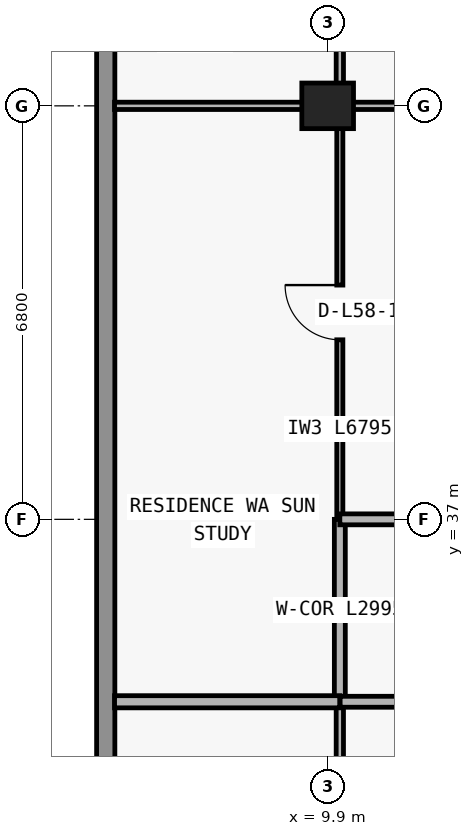
"""IFC4 building model, lengths in metres.
Left out: names, types, materials, properties, quantities, classifications, styles, units other than length and angle.
Written with IfcOpenShell. Run it as: python <this file> out.ifc"""

import sys

from ifc_helpers import new_model, si_unit, direction, frame, frame_2d, origin, origin_2d, place, context, subcontext, project, spatial, rectangle, extrude, element, fill, save


model = new_model("IFC4")
c1 = context("Model", 3, precision=1e-05, world=origin(), true_north=direction((0.0, 1.0)))
c2 = subcontext(c1, "Body", "Model", "MODEL_VIEW")
j1 = project(units=[si_unit("LENGTHUNIT", "METRE"), si_unit("PLANEANGLEUNIT", "RADIAN")], contexts=[c1])
p1 = place(None, origin())
s1 = spatial("IfcSite", under=j1, at=p1, CompositionType="ELEMENT")
p2 = place(p1, origin())
s2 = spatial("IfcBuilding", under=s1, at=p2, CompositionType="ELEMENT")
p3 = place(p2, frame((0.0, 0.0, 208.2)))
s3 = spatial("IfcBuildingStorey", under=s2, at=p3, CompositionType="ELEMENT", Elevation=208.2)
p4 = place(p3, frame((9.9, 43.8, 0.0), z_axis=(0.0, 0.0, 1.0), x_axis=(1.0, 0.0, 0.0)))
e1 = element("IfcColumn", 1, at=p4, inside=s3, PredefinedType="COLUMN", context=c2, shape_type="SweptSolid", body=[
    extrude(rectangle(XDim=0.85, YDim=0.75, at=origin_2d()), origin(), (0.0, 0.0, 1.0), 3.05),
])
p5 = place(p3, frame((6.25, 29.1, 0.0), z_axis=(0.0, 0.0, 1.0), x_axis=(0.0, 1.0, 0.0)))
e2 = element("IfcWall", 2, at=p5, inside=s3, PredefinedType="STANDARD", context=c2, shape_type="SweptSolid", body=[
    extrude(rectangle(XDim=17.9, YDim=0.3, at=frame_2d((8.95, 0.0))), origin(), (0.0, 0.0, 1.0), 3.05),
])
p6 = place(p3, frame((10.1, 11.285, 0.0), z_axis=(0.0, 0.0, 1.0), x_axis=(0.0, 1.0, 0.0)))
e3 = element("IfcWall", 3, at=p6, inside=s3, PredefinedType="PARTITIONING", context=c2, shape_type="SweptSolid", body=[
    extrude(rectangle(XDim=22.715, YDim=0.12, at=frame_2d((11.357, 0.0))), origin(), (0.0, 0.0, 1.0), 2.263),
])
p7 = place(p6, frame((14.045, 0.0, 0.0)))
e4 = element("IfcOpeningElement", 4, at=p7, cuts=e3, PredefinedType="OPENING", context=c2, shape_type="SweptSolid", body=[
    extrude(rectangle(XDim=0.9, YDim=2.15, at=frame_2d((0.45, 1.075))), frame((0.0, 0.07, 0.0), z_axis=(0.0, -1.0, 0.0), x_axis=(1.0, 0.0, 0.0)), (0.0, 0.0, 1.0), 0.14),
])
p8 = place(p3, frame((10.1, 34.005, 0.0), z_axis=(0.0, 0.0, 1.0), x_axis=(0.0, 1.0, 0.0)))
e5 = element("IfcWall", 5, at=p8, inside=s3, PredefinedType="PARTITIONING", context=c2, shape_type="SweptSolid", body=[
    extrude(rectangle(XDim=2.995, YDim=0.18, at=frame_2d((1.498, 0.0))), origin(), (0.0, 0.0, 1.0), 2.263),
])
p9 = place(p3, frame((10.1, 37.005, 0.0), z_axis=(0.0, 0.0, 1.0), x_axis=(0.0, 1.0, 0.0)))
e6 = element("IfcWall", 6, at=p9, inside=s3, PredefinedType="MOVABLE", context=c2, shape_type="SweptSolid", body=[
    extrude(rectangle(XDim=6.795, YDim=0.1, at=frame_2d((3.397, 0.0))), origin(), (0.0, 0.0, 1.0), 2.263),
])
p10 = place(p9, frame((2.948, 0.0, 0.0)))
e7 = element("IfcOpeningElement", 7, at=p10, cuts=e6, PredefinedType="OPENING", context=c2, shape_type="SweptSolid", body=[
    extrude(rectangle(XDim=0.9, YDim=2.15, at=frame_2d((0.45, 1.075))), frame((0.0, 0.06, 0.0), z_axis=(0.0, -1.0, 0.0), x_axis=(1.0, 0.0, 0.0)), (0.0, 0.0, 1.0), 0.12),
])
p11 = place(p3, frame((10.1, 43.805, 0.0), z_axis=(0.0, 0.0, 1.0), x_axis=(0.0, 1.0, 0.0)))
e8 = element("IfcWall", 8, at=p11, inside=s3, PredefinedType="PARTITIONING", context=c2, shape_type="SweptSolid", body=[
    extrude(rectangle(XDim=3.075, YDim=0.12, at=frame_2d((1.538, 0.0))), origin(), (0.0, 0.0, 1.0), 3.05),
])
p12 = place(p11, frame((1.087, 0.0, 0.0)))
e9 = element("IfcOpeningElement", 9, at=p12, cuts=e8, PredefinedType="OPENING", context=c2, shape_type="SweptSolid", body=[
    extrude(rectangle(XDim=0.9, YDim=2.15, at=frame_2d((0.45, 1.075))), frame((0.0, 0.07, 0.0), z_axis=(0.0, -1.0, 0.0), x_axis=(1.0, 0.0, 0.0)), (0.0, 0.0, 1.0), 0.14),
])
p13 = place(p3, frame((6.395, 34.0, 0.0), z_axis=(0.0, 0.0, 1.0), x_axis=(1.0, 0.0, 0.0)))
e10 = element("IfcWall", 10, at=p13, inside=s3, PredefinedType="PARTITIONING", context=c2, shape_type="SweptSolid", body=[
    extrude(rectangle(XDim=3.705, YDim=0.2, at=frame_2d((1.853, 0.0))), origin(), (0.0, 0.0, 1.0), 3.05),
])
p14 = place(p3, frame((10.105, 34.0, 0.0), z_axis=(0.0, 0.0, 1.0), x_axis=(1.0, 0.0, 0.0)))
e11 = element("IfcWall", 11, at=p14, inside=s3, PredefinedType="PARTITIONING", context=c2, shape_type="SweptSolid", body=[
    extrude(rectangle(XDim=16.545, YDim=0.18, at=frame_2d((8.272, 0.0))), origin(), (0.0, 0.0, 1.0), 3.05),
])
p15 = place(p14, frame((2.712, 0.0, 0.0)))
e12 = element("IfcOpeningElement", 12, at=p15, cuts=e11, PredefinedType="OPENING", context=c2, shape_type="SweptSolid", body=[
    extrude(rectangle(XDim=1.0, YDim=2.2, at=frame_2d((0.5, 1.1))), frame((0.0, 0.1, 0.0), z_axis=(0.0, -1.0, 0.0), x_axis=(1.0, 0.0, 0.0)), (0.0, 0.0, 1.0), 0.2),
])
p16 = place(p3, frame((10.1, 37.0, 0.0), z_axis=(0.0, 0.0, 1.0), x_axis=(1.0, 0.0, 0.0)))
e13 = element("IfcWall", 13, at=p16, inside=s3, PredefinedType="PARTITIONING", context=c2, shape_type="SweptSolid", body=[
    extrude(rectangle(XDim=7.845, YDim=0.18, at=frame_2d((3.922, 0.0))), origin(), (0.0, 0.0, 1.0), 3.05),
])
p17 = place(p16, frame((3.496, 0.0, 0.0)))
e14 = element("IfcOpeningElement", 14, at=p17, cuts=e13, PredefinedType="OPENING", context=c2, shape_type="SweptSolid", body=[
    extrude(rectangle(XDim=1.0, YDim=2.2, at=frame_2d((0.5, 1.1))), frame((0.0, 0.1, 0.0), z_axis=(0.0, -1.0, 0.0), x_axis=(1.0, 0.0, 0.0)), (0.0, 0.0, 1.0), 0.2),
])
p18 = place(p3, frame((6.395, 43.8, 0.0), z_axis=(0.0, 0.0, 1.0), x_axis=(1.0, 0.0, 0.0)))
e15 = element("IfcWall", 15, at=p18, inside=s3, PredefinedType="PARTITIONING", context=c2, shape_type="SweptSolid", body=[
    extrude(rectangle(XDim=11.56, YDim=0.12, at=frame_2d((5.78, 0.0))), origin(), (0.0, 0.0, 1.0), 2.418),
])
p19 = place(p18, frame((7.251, 0.0, 0.0)))
e16 = element("IfcOpeningElement", 16, at=p19, cuts=e15, PredefinedType="OPENING", context=c2, shape_type="SweptSolid", body=[
    extrude(rectangle(XDim=0.9, YDim=2.15, at=frame_2d((0.45, 1.075))), frame((0.0, 0.07, 0.0), z_axis=(0.0, -1.0, 0.0), x_axis=(1.0, 0.0, 0.0)), (0.0, 0.0, 1.0), 0.14),
])
p20 = place(p18, frame((9.982, 0.0, 0.0)))
e17 = element("IfcOpeningElement", 17, at=p20, cuts=e15, PredefinedType="OPENING", context=c2, shape_type="SweptSolid", body=[
    extrude(rectangle(XDim=0.85, YDim=2.1, at=frame_2d((0.425, 1.05))), frame((0.0, 0.07, 0.0), z_axis=(0.0, -1.0, 0.0), x_axis=(1.0, 0.0, 0.0)), (0.0, 0.0, 1.0), 0.14),
])
p21 = place(p10, origin())
e18 = element("IfcDoor", 18, at=p21, inside=s3, OperationType="SINGLE_SWING_RIGHT", PredefinedType="DOOR", context=c2, shape_type="SweptSolid", body=[
    extrude(rectangle(XDim=0.9, YDim=2.15, at=frame_2d((0.45, 1.075))), frame((0.0, 0.025, 0.0), z_axis=(0.0, -1.0, 0.0), x_axis=(1.0, 0.0, 0.0)), (0.0, 0.0, 1.0), 0.05),
])
fill(e7, e18)
save(model, sys.argv[1])
